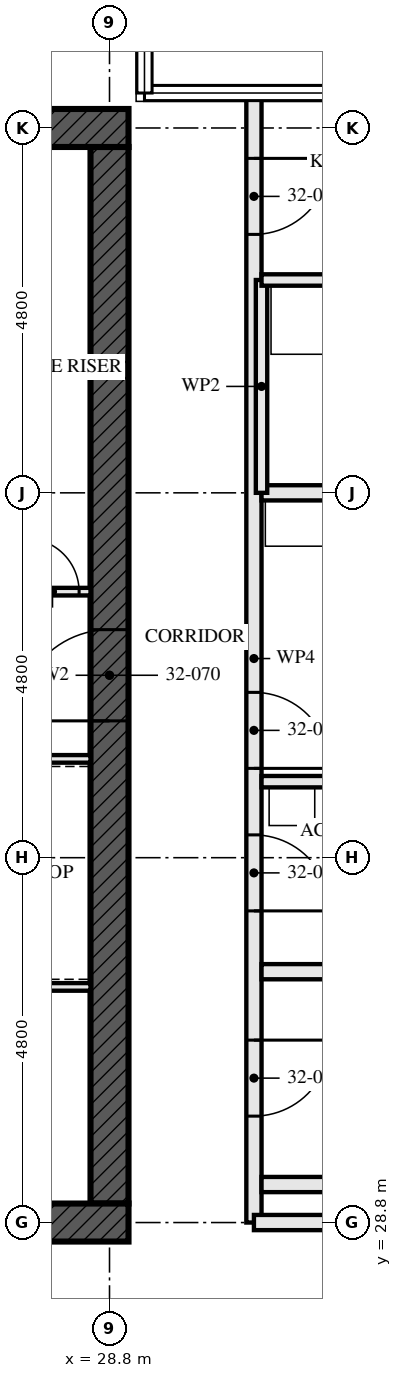
"""IFC4 building model, lengths in metres.
Left out: names, types, materials, properties, quantities, classifications, styles, units other than length and angle.
Written with IfcOpenShell. Run it as: python <this file> out.ifc"""

import sys

from ifc_helpers import new_model, si_unit, direction, frame, frame_2d, origin, place, context, subcontext, project, spatial, rectangle, extrude, element, fill, save


model = new_model("IFC4")
c1 = context("Model", 3, precision=1e-05, world=origin(), true_north=direction((0.0, 1.0)))
c2 = subcontext(c1, "Body", "Model", "MODEL_VIEW")
j1 = project(units=[si_unit("LENGTHUNIT", "METRE"), si_unit("PLANEANGLEUNIT", "RADIAN")], contexts=[c1])
p1 = place(None, origin())
s1 = spatial("IfcSite", under=j1, at=p1, CompositionType="ELEMENT")
p2 = place(p1, origin())
s2 = spatial("IfcBuilding", under=s1, at=p2, CompositionType="ELEMENT")
p3 = place(p2, frame((0.0, 0.0, 119.0)))
s3 = spatial("IfcBuildingStorey", under=s2, at=p3, CompositionType="ELEMENT", Elevation=119.0)
p4 = place(p3, frame((14.15, 28.8, -0.17), z_axis=(0.0, 0.0, 1.0), x_axis=(1.0, 0.0, 0.0)))
e1 = element("IfcWall", 1, at=p4, inside=s3, PredefinedType="SHEAR", context=c2, shape_type="SweptSolid", body=[
    extrude(rectangle(XDim=14.9, YDim=0.5, at=frame_2d((7.45, 0.0))), origin(), (0.0, 0.0, 1.0), 3.5),
])
p5 = place(p4, frame((6.85, 0.0, 0.17)))
e2 = element("IfcOpeningElement", 2, at=p5, cuts=e1, PredefinedType="OPENING", context=c2, shape_type="SweptSolid", body=[
    extrude(rectangle(XDim=1.2, YDim=2.1, at=frame_2d((0.6, 1.05))), frame((0.0, 0.26, 0.0), z_axis=(0.0, -1.0, 0.0), x_axis=(1.0, 0.0, 0.0)), (0.0, 0.0, 1.0), 0.521),
])
p6 = place(p3, frame((29.05, 43.2, -0.17), z_axis=(0.0, 0.0, 1.0), x_axis=(-1.0, 0.0, 0.0)))
e3 = element("IfcWall", 3, at=p6, inside=s3, PredefinedType="SHEAR", context=c2, shape_type="SweptSolid", body=[
    extrude(rectangle(XDim=14.9, YDim=0.5, at=frame_2d((7.45, 0.0))), origin(), (0.0, 0.0, 1.0), 3.5),
])
p7 = place(p6, frame((6.85, 0.0, 0.17)))
e4 = element("IfcOpeningElement", 4, at=p7, cuts=e3, PredefinedType="OPENING", context=c2, shape_type="SweptSolid", body=[
    extrude(rectangle(XDim=1.2, YDim=2.1, at=frame_2d((0.6, 1.05))), frame((0.0, 0.26, 0.0), z_axis=(0.0, -1.0, 0.0), x_axis=(1.0, 0.0, 0.0)), (0.0, 0.0, 1.0), 0.521),
])
p8 = place(p3, frame((28.8, 29.05, -0.17), z_axis=(0.0, 0.0, 1.0), x_axis=(0.0, 1.0, 0.0)))
e5 = element("IfcWall", 5, at=p8, inside=s3, PredefinedType="SHEAR", context=c2, shape_type="SweptSolid", body=[
    extrude(rectangle(XDim=13.9, YDim=0.5, at=frame_2d((6.95, 0.0))), origin(), (0.0, 0.0, 1.0), 3.5),
])
p9 = place(p8, frame((6.35, 0.0, 0.17)))
e6 = element("IfcOpeningElement", 6, at=p9, cuts=e5, PredefinedType="OPENING", context=c2, shape_type="SweptSolid", body=[
    extrude(rectangle(XDim=1.2, YDim=2.1, at=frame_2d((0.6, 1.05))), frame((0.0, 0.26, 0.0), z_axis=(0.0, -1.0, 0.0), x_axis=(1.0, 0.0, 0.0)), (0.0, 0.0, 1.0), 0.521),
])
for number, where, z_axis, x_axis in (
    (7, (35.5, 29.3, 0.0), (0.0, 0.0, 1.0), (-1.0, 0.0, 0.0)),
    (8, (35.5, 32.1, 0.0), (0.0, 0.0, 1.0), (-1.0, 0.0, 0.0)),
):
    element("IfcWall", number, at=place(p3, frame(where, z_axis=z_axis, x_axis=x_axis)), inside=s3, PredefinedType="SOLIDWALL", context=c2, shape_type="SweptSolid", body=[
        extrude(rectangle(XDim=4.7, YDim=0.2, at=frame_2d((2.35, 0.0))), origin(), (0.0, 0.0, 1.0), 2.99),
    ])
p10 = place(p3, frame((33.8, 34.6, 0.0), z_axis=(0.0, 0.0, 1.0), x_axis=(-1.0, 0.0, 0.0)))
e9 = element("IfcWall", 9, at=p10, inside=s3, PredefinedType="PARTITIONING", context=c2, shape_type="SweptSolid", body=[
    extrude(rectangle(XDim=3.0, YDim=0.15, at=frame_2d((1.5, 0.0))), origin(), (0.0, 0.0, 1.0), 3.33),
])
p11 = place(p3, frame((38.08, 38.4, 0.0), z_axis=(0.0, 0.0, 1.0), x_axis=(-1.0, 0.0, 0.0)))
e10 = element("IfcWall", 10, at=p11, inside=s3, PredefinedType="PARTITIONING", context=c2, shape_type="SweptSolid", body=[
    extrude(rectangle(XDim=7.28, YDim=0.2, at=frame_2d((3.64, 0.0))), origin(), (0.0, 0.0, 1.0), 2.55),
])
p12 = place(p3, frame((33.8, 41.2, 0.0), z_axis=(0.0, 0.0, 1.0), x_axis=(-1.0, 0.0, 0.0)))
e11 = element("IfcWall", 11, at=p12, inside=s3, PredefinedType="PARTITIONING", context=c2, shape_type="SweptSolid", body=[
    extrude(rectangle(XDim=3.0, YDim=0.15, at=frame_2d((1.5, 0.0))), origin(), (0.0, 0.0, 1.0), 3.33),
])
p13 = place(p3, frame((30.8, 38.4, 0.0), z_axis=(0.0, 0.0, 1.0), x_axis=(0.0, 1.0, 0.0)))
e12 = element("IfcWall", 12, at=p13, inside=s3, PredefinedType="PARTITIONING", context=c2, shape_type="SweptSolid", body=[
    extrude(rectangle(XDim=2.8, YDim=0.15, at=frame_2d((1.4, 0.0))), origin(), (0.0, 0.0, 1.0), 3.33),
])
p14 = place(p3, frame((30.7, 28.8, 0.0), z_axis=(0.0, 0.0, 1.0), x_axis=(0.0, 1.0, 0.0)))
e13 = element("IfcWall", 13, at=p14, inside=s3, PredefinedType="PARTITIONING", context=c2, shape_type="SweptSolid", body=[
    extrude(rectangle(XDim=14.84, YDim=0.2, at=frame_2d((7.42, 0.0))), origin(), (0.0, 0.0, 1.0), 2.32),
])
p15 = place(p14, frame((1.4, 0.0, 0.0)))
e14 = element("IfcOpeningElement", 14, at=p15, cuts=e13, PredefinedType="OPENING", context=c2, shape_type="SweptSolid", body=[
    extrude(rectangle(XDim=1.0, YDim=2.1, at=frame_2d((0.5, 1.05))), frame((0.0, 0.111, 0.0), z_axis=(0.0, -1.0, 0.0), x_axis=(1.0, 0.0, 0.0)), (0.0, 0.0, 1.0), 0.221),
])
p16 = place(p14, frame((4.1, 0.0, 0.0)))
e15 = element("IfcOpeningElement", 15, at=p16, cuts=e13, PredefinedType="OPENING", context=c2, shape_type="SweptSolid", body=[
    extrude(rectangle(XDim=1.0, YDim=2.1, at=frame_2d((0.5, 1.05))), frame((0.0, 0.111, 0.0), z_axis=(0.0, -1.0, 0.0), x_axis=(1.0, 0.0, 0.0)), (0.0, 0.0, 1.0), 0.221),
])
p17 = place(p14, frame((5.975, 0.0, 0.0)))
e16 = element("IfcOpeningElement", 16, at=p17, cuts=e13, PredefinedType="OPENING", context=c2, shape_type="SweptSolid", body=[
    extrude(rectangle(XDim=1.0, YDim=2.1, at=frame_2d((0.5, 1.05))), frame((0.0, 0.111, 0.0), z_axis=(0.0, -1.0, 0.0), x_axis=(1.0, 0.0, 0.0)), (0.0, 0.0, 1.0), 0.221),
])
p18 = place(p14, frame((13.0, 0.0, 0.0)))
e17 = element("IfcOpeningElement", 17, at=p18, cuts=e13, PredefinedType="OPENING", context=c2, shape_type="SweptSolid", body=[
    extrude(rectangle(XDim=1.0, YDim=2.1, at=frame_2d((0.5, 1.05))), frame((0.0, 0.111, 0.0), z_axis=(0.0, -1.0, 0.0), x_axis=(1.0, 0.0, 0.0)), (0.0, 0.0, 1.0), 0.221),
])
p19 = place(p3, frame((23.05, 34.9, 0.0), z_axis=(0.0, 0.0, 1.0), x_axis=(1.0, 0.0, 0.0)))
e18 = element("IfcWall", 18, at=p19, inside=s3, PredefinedType="SOLIDWALL", context=c2, shape_type="SweptSolid", body=[
    extrude(rectangle(XDim=5.5, YDim=0.1, at=frame_2d((2.75, 0.0))), origin(), (0.0, 0.0, 1.0), 3.33),
])
p20 = place(p3, frame((22.65, 37.1, 0.0), z_axis=(0.0, 0.0, 1.0), x_axis=(1.0, 0.0, 0.0)))
e19 = element("IfcWall", 19, at=p20, inside=s3, PredefinedType="SOLIDWALL", context=c2, shape_type="SweptSolid", body=[
    extrude(rectangle(XDim=5.9, YDim=0.1, at=frame_2d((2.95, 0.0))), origin(), (0.0, 0.0, 1.0), 3.33),
])
p21 = place(p20, frame((3.5, 0.0, 0.0)))
e20 = element("IfcOpeningElement", 20, at=p21, cuts=e19, PredefinedType="OPENING", context=c2, shape_type="SweptSolid", body=[
    extrude(rectangle(XDim=0.9, YDim=2.1, at=frame_2d((0.45, 1.05))), frame((0.0, 0.061, 0.0), z_axis=(0.0, -1.0, 0.0), x_axis=(1.0, 0.0, 0.0)), (0.0, 0.0, 1.0), 0.121),
])
p22 = place(p20, frame((5.05, 0.0, 0.0)))
e21 = element("IfcOpeningElement", 21, at=p22, cuts=e19, PredefinedType="OPENING", context=c2, shape_type="SweptSolid", body=[
    extrude(rectangle(XDim=0.7, YDim=2.1, at=frame_2d((0.35, 1.05))), frame((0.0, 0.061, 0.0), z_axis=(0.0, -1.0, 0.0), x_axis=(1.0, 0.0, 0.0)), (0.0, 0.0, 1.0), 0.121),
])
p23 = place(p3, frame((23.15, 31.9, 0.0), z_axis=(0.0, 0.0, 1.0), x_axis=(1.0, 0.0, 0.0)))
e22 = element("IfcWall", 22, at=p23, inside=s3, PredefinedType="SOLIDWALL", context=c2, shape_type="SweptSolid", body=[
    extrude(rectangle(XDim=5.4, YDim=0.1, at=frame_2d((2.7, 0.0))), origin(), (0.0, 0.0, 1.0), 3.33),
])
p24 = place(p3, frame((33.255, 28.8, 0.0), z_axis=(0.0, 0.0, 1.0), x_axis=(-1.0, 0.0, 0.0)))
e23 = element("IfcWall", 23, at=p24, inside=s3, PredefinedType="PARTITIONING", context=c2, shape_type="SweptSolid", body=[
    extrude(rectangle(XDim=2.555, YDim=0.2, at=frame_2d((1.277, 0.0))), origin(), (0.0, 0.0, 1.0), 2.32),
])
p25 = place(p15, frame((1.0, 0.0, 0.0), z_axis=(0.0, 0.0, 1.0), x_axis=(-1.0, 0.0, 0.0)))
e24 = element("IfcDoor", 24, at=p25, inside=s3, OperationType="SINGLE_SWING_RIGHT", PredefinedType="DOOR", context=c2, shape_type="SweptSolid", body=[
    extrude(rectangle(XDim=1.0, YDim=2.1, at=frame_2d((0.5, 1.05))), frame((0.0, 0.032, 0.0), z_axis=(0.0, -1.0, 0.0), x_axis=(1.0, 0.0, 0.0)), (0.0, 0.0, 1.0), 0.064),
])
fill(e14, e24)
p26 = place(p16, frame((1.0, 0.0, 0.0), z_axis=(0.0, 0.0, 1.0), x_axis=(-1.0, 0.0, 0.0)))
e25 = element("IfcDoor", 25, at=p26, inside=s3, OperationType="SINGLE_SWING_LEFT", PredefinedType="DOOR", context=c2, shape_type="SweptSolid", body=[
    extrude(rectangle(XDim=1.0, YDim=2.1, at=frame_2d((0.5, 1.05))), frame((0.0, 0.027, 0.0), z_axis=(0.0, -1.0, 0.0), x_axis=(1.0, 0.0, 0.0)), (0.0, 0.0, 1.0), 0.054),
])
fill(e15, e25)
p27 = place(p17, frame((1.0, 0.0, 0.0), z_axis=(0.0, 0.0, 1.0), x_axis=(-1.0, 0.0, 0.0)))
e26 = element("IfcDoor", 26, at=p27, inside=s3, OperationType="SINGLE_SWING_LEFT", PredefinedType="DOOR", context=c2, shape_type="SweptSolid", body=[
    extrude(rectangle(XDim=1.0, YDim=2.1, at=frame_2d((0.5, 1.05))), frame((0.0, 0.027, 0.0), z_axis=(0.0, -1.0, 0.0), x_axis=(1.0, 0.0, 0.0)), (0.0, 0.0, 1.0), 0.054),
])
fill(e16, e26)
p28 = place(p18, frame((1.0, 0.0, 0.0), z_axis=(0.0, 0.0, 1.0), x_axis=(-1.0, 0.0, 0.0)))
e27 = element("IfcDoor", 27, at=p28, inside=s3, OperationType="SINGLE_SWING_RIGHT", PredefinedType="DOOR", context=c2, shape_type="SweptSolid", body=[
    extrude(rectangle(XDim=1.0, YDim=2.1, at=frame_2d((0.5, 1.05))), frame((0.0, 0.027, 0.0), z_axis=(0.0, -1.0, 0.0), x_axis=(1.0, 0.0, 0.0)), (0.0, 0.0, 1.0), 0.054),
])
fill(e17, e27)
p29 = place(p22, origin())
e28 = element("IfcDoor", 28, at=p29, inside=s3, OperationType="SINGLE_SWING_RIGHT", PredefinedType="DOOR", context=c2, shape_type="SweptSolid", body=[
    extrude(rectangle(XDim=0.7, YDim=2.1, at=frame_2d((0.35, 1.05))), frame((0.0, 0.027, 0.0), z_axis=(0.0, -1.0, 0.0), x_axis=(1.0, 0.0, 0.0)), (0.0, 0.0, 1.0), 0.054),
])
fill(e21, e28)
p30 = place(p9, origin())
e29 = element("IfcDoor", 29, at=p30, inside=s3, OperationType="SINGLE_SWING_LEFT", PredefinedType="DOOR", context=c2, shape_type="SweptSolid", body=[
    extrude(rectangle(XDim=1.2, YDim=2.1, at=frame_2d((0.6, 1.05))), frame((0.0, 0.027, 0.0), z_axis=(0.0, -1.0, 0.0), x_axis=(1.0, 0.0, 0.0)), (0.0, 0.0, 1.0), 0.054),
])
fill(e6, e29)
save(model, sys.argv[1])
